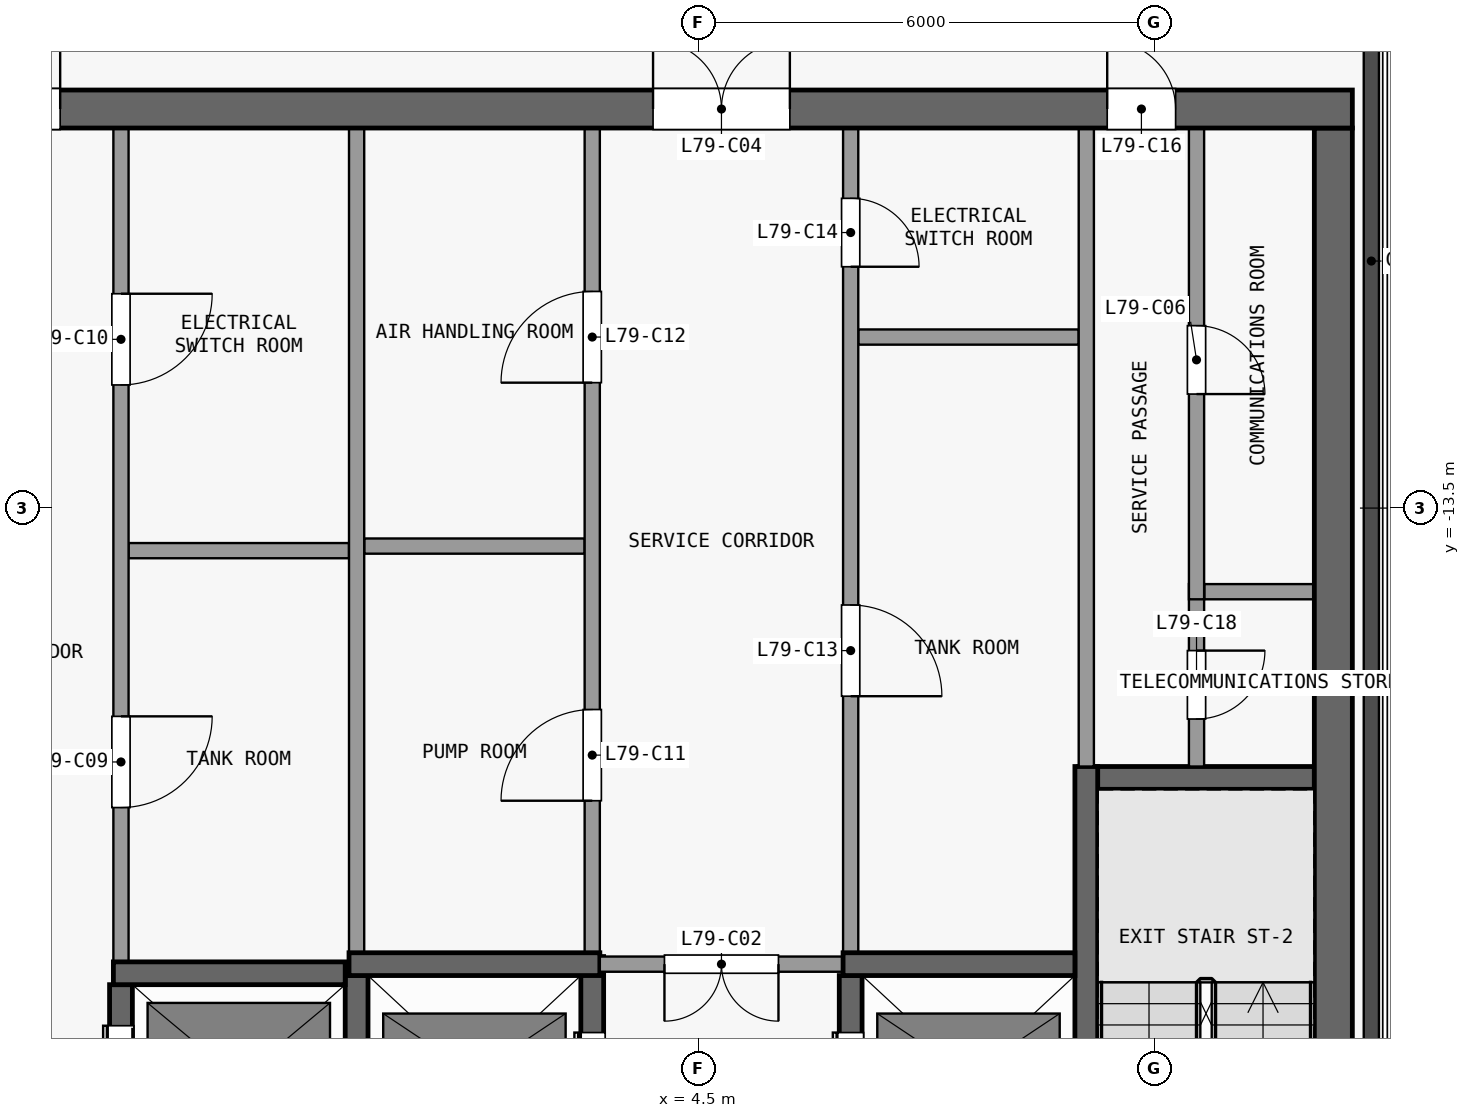
"""IFC4 building model, lengths in metres.
Left out: names, types, materials, properties, quantities, classifications, styles, units other than length and angle.
Written with IfcOpenShell. Run it as: python <this file> out.ifc"""

import sys

from ifc_helpers import new_model, si_unit, direction, frame, frame_2d, origin, place, context, subcontext, project, spatial, rectangle, extrude, element, fill, save


model = new_model("IFC4")
c1 = context("Model", 3, precision=1e-05, world=origin(), true_north=direction((0.0, 1.0)))
c2 = subcontext(c1, "Body", "Model", "MODEL_VIEW")
j1 = project(units=[si_unit("LENGTHUNIT", "METRE"), si_unit("PLANEANGLEUNIT", "RADIAN")], contexts=[c1])
p1 = place(None, origin())
s1 = spatial("IfcSite", under=j1, at=p1, CompositionType="ELEMENT")
p2 = place(p1, origin())
s2 = spatial("IfcBuilding", under=s1, at=p2, CompositionType="ELEMENT")
p3 = place(p2, frame((0.0, 0.0, 312.2)))
s3 = spatial("IfcBuildingStorey", under=s2, at=p3, CompositionType="ELEMENT", Elevation=312.2)
p4 = place(p3, frame((-13.1, -8.25, 0.0), z_axis=(0.0, 0.0, 1.0), x_axis=(1.0, 0.0, 0.0)))
e1 = element("IfcWall", 1, at=p4, inside=s3, PredefinedType="SHEAR", context=c2, shape_type="SweptSolid", body=[
    extrude(rectangle(XDim=26.2, YDim=0.5, at=frame_2d((13.1, 0.0))), origin(), (0.0, 0.0, 1.0), 4.2),
])
p5 = place(p4, frame((7.4, 0.0, 0.0)))
e2 = element("IfcOpeningElement", 2, at=p5, cuts=e1, PredefinedType="OPENING", context=c2, shape_type="SweptSolid", body=[
    extrude(rectangle(XDim=1.8, YDim=2.1, at=frame_2d((0.9, 1.05))), frame((0.0, 0.26, 0.0), z_axis=(0.0, -1.0, 0.0), x_axis=(1.0, 0.0, 0.0)), (0.0, 0.0, 1.0), 0.52),
])
p6 = place(p4, frame((17.0, 0.0, 0.0)))
e3 = element("IfcOpeningElement", 3, at=p6, cuts=e1, PredefinedType="OPENING", context=c2, shape_type="SweptSolid", body=[
    extrude(rectangle(XDim=1.8, YDim=2.1, at=frame_2d((0.9, 1.05))), frame((0.0, 0.26, 0.0), z_axis=(0.0, -1.0, 0.0), x_axis=(1.0, 0.0, 0.0)), (0.0, 0.0, 1.0), 0.52),
])
p7 = place(p4, frame((1.325, 0.0, 0.0)))
e4 = element("IfcOpeningElement", 4, at=p7, cuts=e1, PredefinedType="OPENING", context=c2, shape_type="SweptSolid", body=[
    extrude(rectangle(XDim=1.2, YDim=2.1, at=frame_2d((0.6, 1.05))), frame((0.0, 0.26, 0.0), z_axis=(0.0, -1.0, 0.0), x_axis=(1.0, 0.0, 0.0)), (0.0, 0.0, 1.0), 0.52),
])
p8 = place(p4, frame((22.975, 0.0, 0.0)))
e5 = element("IfcOpeningElement", 5, at=p8, cuts=e1, PredefinedType="OPENING", context=c2, shape_type="SweptSolid", body=[
    extrude(rectangle(XDim=0.9, YDim=2.1, at=frame_2d((0.45, 1.05))), frame((0.0, 0.26, 0.0), z_axis=(0.0, -1.0, 0.0), x_axis=(1.0, 0.0, 0.0)), (0.0, 0.0, 1.0), 0.52),
])
p9 = place(p3, frame((12.85, -24.6, 0.0), z_axis=(0.0, 0.0, 1.0), x_axis=(0.0, 1.0, 0.0)))
e6 = element("IfcWall", 6, at=p9, inside=s3, PredefinedType="SHEAR", context=c2, shape_type="SweptSolid", body=[
    extrude(rectangle(XDim=16.1, YDim=0.5, at=frame_2d((8.05, 0.0))), origin(), (0.0, 0.0, 1.0), 4.2),
])
p10 = place(p3, frame((-3.2, -19.62, 0.0), z_axis=(0.0, 0.0, 1.0), x_axis=(1.0, 0.0, 0.0)))
e7 = element("IfcWall", 7, at=p10, inside=s3, PredefinedType="SHEAR", context=c2, shape_type="SweptSolid", body=[
    extrude(rectangle(XDim=3.05, YDim=0.3, at=frame_2d((1.525, 0.0))), origin(), (0.0, 0.0, 1.0), 4.2),
])
p11 = place(p3, frame((-0.1, -19.5, 0.0), z_axis=(0.0, 0.0, 1.0), x_axis=(1.0, 0.0, 0.0)))
e8 = element("IfcWall", 8, at=p11, inside=s3, PredefinedType="SHEAR", context=c2, shape_type="SweptSolid", body=[
    extrude(rectangle(XDim=3.3, YDim=0.3, at=frame_2d((1.65, 0.0))), origin(), (0.0, 0.0, 1.0), 4.2),
])
p12 = place(p3, frame((6.4, -19.5, 0.0), z_axis=(0.0, 0.0, 1.0), x_axis=(-1.0, 0.0, 0.0)))
e9 = element("IfcWall", 9, at=p12, inside=s3, PredefinedType="PARTITIONING", context=c2, shape_type="SweptSolid", body=[
    extrude(rectangle(XDim=3.2, YDim=0.2, at=frame_2d((1.6, 0.0))), origin(), (0.0, 0.0, 1.0), 4.2),
])
p13 = place(p12, frame((0.85, 0.0, 0.0)))
e10 = element("IfcOpeningElement", 10, at=p13, cuts=e9, PredefinedType="OPENING", context=c2, shape_type="SweptSolid", body=[
    extrude(rectangle(XDim=1.5, YDim=2.1, at=frame_2d((0.75, 1.05))), frame((0.0, 0.11, 0.0), z_axis=(0.0, -1.0, 0.0), x_axis=(1.0, 0.0, 0.0)), (0.0, 0.0, 1.0), 0.22),
])
p14 = place(p3, frame((6.4, -19.5, 0.0), z_axis=(0.0, 0.0, 1.0), x_axis=(1.0, 0.0, 0.0)))
e11 = element("IfcWall", 11, at=p14, inside=s3, PredefinedType="SHEAR", context=c2, shape_type="SweptSolid", body=[
    extrude(rectangle(XDim=3.05, YDim=0.3, at=frame_2d((1.525, 0.0))), origin(), (0.0, 0.0, 1.0), 4.2),
])
p15 = place(p3, frame((9.5, -17.05, 0.0), z_axis=(0.0, 0.0, 1.0), x_axis=(1.0, 0.0, 0.0)))
e12 = element("IfcWall", 12, at=p15, inside=s3, PredefinedType="SHEAR", context=c2, shape_type="SweptSolid", body=[
    extrude(rectangle(XDim=3.1, YDim=0.3, at=frame_2d((1.55, 0.0))), origin(), (0.0, 0.0, 1.0), 4.2),
])
p16 = place(p3, frame((11.15, -14.6, 0.0), z_axis=(0.0, 0.0, 1.0), x_axis=(1.0, 0.0, 0.0)))
e13 = element("IfcWall", 13, at=p16, inside=s3, PredefinedType="PARTITIONING", context=c2, shape_type="SweptSolid", body=[
    extrude(rectangle(XDim=1.45, YDim=0.2, at=frame_2d((0.725, 0.0))), origin(), (0.0, 0.0, 1.0), 4.2),
])
for number, where, z_axis, x_axis in (
    (14, (-3.0, -14.06, 0.0), (0.0, 0.0, 1.0), (1.0, 0.0, 0.0)),
    (15, (0.1, -14.0, 0.0), (0.0, 0.0, 1.0), (1.0, 0.0, 0.0)),
    (16, (6.6, -11.25, 0.0), (0.0, 0.0, 1.0), (1.0, 0.0, 0.0)),
):
    element("IfcWall", number, at=place(p3, frame(where, z_axis=z_axis, x_axis=x_axis)), inside=s3, PredefinedType="PARTITIONING", context=c2, shape_type="SweptSolid", body=[
        extrude(rectangle(XDim=2.9, YDim=0.2, at=frame_2d((1.45, 0.0))), origin(), (0.0, 0.0, 1.0), 4.2),
    ])
p17 = place(p3, frame((-3.1, -22.25, 0.0), z_axis=(0.0, 0.0, 1.0), x_axis=(0.0, 1.0, 0.0)))
e17 = element("IfcWall", 17, at=p17, inside=s3, PredefinedType="SHEAR", context=c2, shape_type="SweptSolid", body=[
    extrude(rectangle(XDim=2.48, YDim=0.3, at=frame_2d((1.24, 0.0))), origin(), (0.0, 0.0, 1.0), 4.2),
])
p18 = place(p17, frame((0.54, 0.0, 0.0)))
e18 = element("IfcOpeningElement", 18, at=p18, cuts=e17, PredefinedType="OPENING", context=c2, shape_type="SweptSolid", body=[
    extrude(rectangle(XDim=1.4, YDim=2.1, at=frame_2d((0.7, 1.05))), frame((0.0, 0.16, 0.0), z_axis=(0.0, -1.0, 0.0), x_axis=(1.0, 0.0, 0.0)), (0.0, 0.0, 1.0), 0.32),
])
p19 = place(p3, frame((-3.1, -8.5, 0.0), z_axis=(0.0, 0.0, 1.0), x_axis=(0.0, -1.0, 0.0)))
e19 = element("IfcWall", 19, at=p19, inside=s3, PredefinedType="PARTITIONING", context=c2, shape_type="SweptSolid", body=[
    extrude(rectangle(XDim=10.97, YDim=0.2, at=frame_2d((5.485, 0.0))), origin(), (0.0, 0.0, 1.0), 4.2),
])
p20 = place(p19, frame((7.74, 0.0, 0.0)))
e20 = element("IfcOpeningElement", 20, at=p20, cuts=e19, PredefinedType="OPENING", context=c2, shape_type="SweptSolid", body=[
    extrude(rectangle(XDim=1.2, YDim=2.1, at=frame_2d((0.6, 1.05))), frame((0.0, 0.11, 0.0), z_axis=(0.0, -1.0, 0.0), x_axis=(1.0, 0.0, 0.0)), (0.0, 0.0, 1.0), 0.22),
])
p21 = place(p19, frame((2.18, 0.0, 0.0)))
e21 = element("IfcOpeningElement", 21, at=p21, cuts=e19, PredefinedType="OPENING", context=c2, shape_type="SweptSolid", body=[
    extrude(rectangle(XDim=1.2, YDim=2.1, at=frame_2d((0.6, 1.05))), frame((0.0, 0.11, 0.0), z_axis=(0.0, -1.0, 0.0), x_axis=(1.0, 0.0, 0.0)), (0.0, 0.0, 1.0), 0.22),
])
p22 = place(p3, frame((0.0, -22.25, 0.0), z_axis=(0.0, 0.0, 1.0), x_axis=(0.0, 1.0, 0.0)))
e22 = element("IfcWall", 22, at=p22, inside=s3, PredefinedType="SHEAR", context=c2, shape_type="SweptSolid", body=[
    extrude(rectangle(XDim=2.6, YDim=0.3, at=frame_2d((1.3, 0.0))), origin(), (0.0, 0.0, 1.0), 4.2),
])
p23 = place(p3, frame((0.0, -19.35, 0.0), z_axis=(0.0, 0.0, 1.0), x_axis=(0.0, 1.0, 0.0)))
e23 = element("IfcWall", 23, at=p23, inside=s3, PredefinedType="PARTITIONING", context=c2, shape_type="SweptSolid", body=[
    extrude(rectangle(XDim=10.85, YDim=0.2, at=frame_2d((5.425, 0.0))), origin(), (0.0, 0.0, 1.0), 4.2),
])
p24 = place(p3, frame((3.1, -22.25, 0.0), z_axis=(0.0, 0.0, 1.0), x_axis=(0.0, 1.0, 0.0)))
e24 = element("IfcWall", 24, at=p24, inside=s3, PredefinedType="SHEAR", context=c2, shape_type="SweptSolid", body=[
    extrude(rectangle(XDim=2.85, YDim=0.3, at=frame_2d((1.425, 0.0))), origin(), (0.0, 0.0, 1.0), 4.2),
])
p25 = place(p24, frame((0.75, 0.0, 0.0)))
e25 = element("IfcOpeningElement", 25, at=p25, cuts=e24, PredefinedType="OPENING", context=c2, shape_type="SweptSolid", body=[
    extrude(rectangle(XDim=1.1, YDim=2.1, at=frame_2d((0.55, 1.05))), frame((0.0, 0.16, 0.0), z_axis=(0.0, -1.0, 0.0), x_axis=(1.0, 0.0, 0.0)), (0.0, 0.0, 1.0), 0.32),
])
p26 = place(p3, frame((3.1, -19.6, 0.0), z_axis=(0.0, 0.0, 1.0), x_axis=(0.0, 1.0, 0.0)))
e26 = element("IfcWall", 26, at=p26, inside=s3, PredefinedType="PARTITIONING", context=c2, shape_type="SweptSolid", body=[
    extrude(rectangle(XDim=11.1, YDim=0.2, at=frame_2d((5.55, 0.0))), origin(), (0.0, 0.0, 1.0), 4.2),
])
p27 = place(p26, frame((2.25, 0.0, 0.0)))
e27 = element("IfcOpeningElement", 27, at=p27, cuts=e26, PredefinedType="OPENING", context=c2, shape_type="SweptSolid", body=[
    extrude(rectangle(XDim=1.2, YDim=2.1, at=frame_2d((0.6, 1.05))), frame((0.0, 0.11, 0.0), z_axis=(0.0, -1.0, 0.0), x_axis=(1.0, 0.0, 0.0)), (0.0, 0.0, 1.0), 0.22),
])
p28 = place(p26, frame((7.75, 0.0, 0.0)))
e28 = element("IfcOpeningElement", 28, at=p28, cuts=e26, PredefinedType="OPENING", context=c2, shape_type="SweptSolid", body=[
    extrude(rectangle(XDim=1.2, YDim=2.1, at=frame_2d((0.6, 1.05))), frame((0.0, 0.11, 0.0), z_axis=(0.0, -1.0, 0.0), x_axis=(1.0, 0.0, 0.0)), (0.0, 0.0, 1.0), 0.22),
])
p29 = place(p3, frame((6.5, -22.25, 0.0), z_axis=(0.0, 0.0, 1.0), x_axis=(0.0, 1.0, 0.0)))
e29 = element("IfcWall", 29, at=p29, inside=s3, PredefinedType="SHEAR", context=c2, shape_type="SweptSolid", body=[
    extrude(rectangle(XDim=2.6, YDim=0.3, at=frame_2d((1.3, 0.0))), origin(), (0.0, 0.0, 1.0), 4.2),
])
p30 = place(p29, frame((0.75, 0.0, 0.0)))
e30 = element("IfcOpeningElement", 30, at=p30, cuts=e29, PredefinedType="OPENING", context=c2, shape_type="SweptSolid", body=[
    extrude(rectangle(XDim=1.1, YDim=2.1, at=frame_2d((0.55, 1.05))), frame((0.0, 0.16, 0.0), z_axis=(0.0, -1.0, 0.0), x_axis=(1.0, 0.0, 0.0)), (0.0, 0.0, 1.0), 0.32),
])
p31 = place(p3, frame((6.5, -8.5, 0.0), z_axis=(0.0, 0.0, 1.0), x_axis=(0.0, -1.0, 0.0)))
e31 = element("IfcWall", 31, at=p31, inside=s3, PredefinedType="PARTITIONING", context=c2, shape_type="SweptSolid", body=[
    extrude(rectangle(XDim=10.85, YDim=0.2, at=frame_2d((5.425, 0.0))), origin(), (0.0, 0.0, 1.0), 4.2),
])
p32 = place(p31, frame((6.275, 0.0, 0.0)))
e32 = element("IfcOpeningElement", 32, at=p32, cuts=e31, PredefinedType="OPENING", context=c2, shape_type="SweptSolid", body=[
    extrude(rectangle(XDim=1.2, YDim=2.1, at=frame_2d((0.6, 1.05))), frame((0.0, 0.11, 0.0), z_axis=(0.0, -1.0, 0.0), x_axis=(1.0, 0.0, 0.0)), (0.0, 0.0, 1.0), 0.22),
])
p33 = place(p31, frame((0.925, 0.0, 0.0)))
e33 = element("IfcOpeningElement", 33, at=p33, cuts=e31, PredefinedType="OPENING", context=c2, shape_type="SweptSolid", body=[
    extrude(rectangle(XDim=0.9, YDim=2.1, at=frame_2d((0.45, 1.05))), frame((0.0, 0.11, 0.0), z_axis=(0.0, -1.0, 0.0), x_axis=(1.0, 0.0, 0.0)), (0.0, 0.0, 1.0), 0.22),
])
p34 = place(p3, frame((9.6, -16.9, 0.0), z_axis=(0.0, 0.0, 1.0), x_axis=(0.0, -1.0, 0.0)))
e34 = element("IfcWall", 34, at=p34, inside=s3, PredefinedType="SHEAR", context=c2, shape_type="SweptSolid", body=[
    extrude(rectangle(XDim=7.7, YDim=0.3, at=frame_2d((3.85, 0.0))), origin(), (0.0, 0.0, 1.0), 4.2),
])
p35 = place(p34, frame((6.5, 0.0, 0.0)))
e35 = element("IfcOpeningElement", 35, at=p35, cuts=e34, PredefinedType="OPENING", context=c2, shape_type="SweptSolid", body=[
    extrude(rectangle(XDim=1.1, YDim=2.1, at=frame_2d((0.55, 1.05))), frame((0.0, 0.16, 0.0), z_axis=(0.0, -1.0, 0.0), x_axis=(1.0, 0.0, 0.0)), (0.0, 0.0, 1.0), 0.32),
])
p36 = place(p3, frame((9.6, -16.9, 0.0), z_axis=(0.0, 0.0, 1.0), x_axis=(0.0, 1.0, 0.0)))
e36 = element("IfcWall", 36, at=p36, inside=s3, PredefinedType="PARTITIONING", context=c2, shape_type="SweptSolid", body=[
    extrude(rectangle(XDim=8.4, YDim=0.2, at=frame_2d((4.2, 0.0))), origin(), (0.0, 0.0, 1.0), 4.2),
])
p37 = place(p3, frame((11.05, -14.5, 0.0), z_axis=(0.0, 0.0, 1.0), x_axis=(0.0, -1.0, 0.0)))
e37 = element("IfcWall", 37, at=p37, inside=s3, PredefinedType="PARTITIONING", context=c2, shape_type="SweptSolid", body=[
    extrude(rectangle(XDim=2.4, YDim=0.2, at=frame_2d((1.2, 0.0))), origin(), (0.0, 0.0, 1.0), 4.2),
])
p38 = place(p37, frame((0.875, 0.0, 0.0)))
e38 = element("IfcOpeningElement", 38, at=p38, cuts=e37, PredefinedType="OPENING", context=c2, shape_type="SweptSolid", body=[
    extrude(rectangle(XDim=0.9, YDim=2.1, at=frame_2d((0.45, 1.05))), frame((0.0, 0.11, 0.0), z_axis=(0.0, -1.0, 0.0), x_axis=(1.0, 0.0, 0.0)), (0.0, 0.0, 1.0), 0.22),
])
p39 = place(p3, frame((11.05, -8.5, 0.0), z_axis=(0.0, 0.0, 1.0), x_axis=(0.0, -1.0, 0.0)))
e39 = element("IfcWall", 39, at=p39, inside=s3, PredefinedType="PARTITIONING", context=c2, shape_type="SweptSolid", body=[
    extrude(rectangle(XDim=6.2, YDim=0.2, at=frame_2d((3.1, 0.0))), origin(), (0.0, 0.0, 1.0), 4.2),
])
p40 = place(p39, frame((2.6, 0.0, 0.0)))
e40 = element("IfcOpeningElement", 40, at=p40, cuts=e39, PredefinedType="OPENING", context=c2, shape_type="SweptSolid", body=[
    extrude(rectangle(XDim=0.9, YDim=2.1, at=frame_2d((0.45, 1.05))), frame((0.0, 0.11, 0.0), z_axis=(0.0, -1.0, 0.0), x_axis=(1.0, 0.0, 0.0)), (0.0, 0.0, 1.0), 0.22),
])
p41 = place(p25, origin())
e41 = element("IfcDoor", 41, at=p41, inside=s3, OperationType="DOUBLE_DOOR_SLIDING", PredefinedType="DOOR", context=c2, shape_type="SweptSolid", body=[
    extrude(rectangle(XDim=1.1, YDim=2.1, at=frame_2d((0.55, 1.05))), frame((0.0, 0.025, 0.0), z_axis=(0.0, -1.0, 0.0), x_axis=(1.0, 0.0, 0.0)), (0.0, 0.0, 1.0), 0.05),
])
fill(e25, e41)
p42 = place(p30, origin())
e42 = element("IfcDoor", 42, at=p42, inside=s3, OperationType="DOUBLE_DOOR_SLIDING", PredefinedType="DOOR", context=c2, shape_type="SweptSolid", body=[
    extrude(rectangle(XDim=1.1, YDim=2.1, at=frame_2d((0.55, 1.05))), frame((0.0, 0.025, 0.0), z_axis=(0.0, -1.0, 0.0), x_axis=(1.0, 0.0, 0.0)), (0.0, 0.0, 1.0), 0.05),
])
fill(e30, e42)
p43 = place(p18, origin())
e43 = element("IfcDoor", 43, at=p43, inside=s3, OperationType="DOUBLE_DOOR_SLIDING", PredefinedType="DOOR", context=c2, shape_type="SweptSolid", body=[
    extrude(rectangle(XDim=1.4, YDim=2.1, at=frame_2d((0.7, 1.05))), frame((0.0, 0.025, 0.0), z_axis=(0.0, -1.0, 0.0), x_axis=(1.0, 0.0, 0.0)), (0.0, 0.0, 1.0), 0.05),
])
fill(e18, e43)
p44 = place(p13, origin())
e44 = element("IfcDoor", 44, at=p44, inside=s3, OperationType="DOUBLE_DOOR_SINGLE_SWING", PredefinedType="DOOR", context=c2, shape_type="SweptSolid", body=[
    extrude(rectangle(XDim=1.5, YDim=2.1, at=frame_2d((0.75, 1.05))), frame((0.0, 0.025, 0.0), z_axis=(0.0, -1.0, 0.0), x_axis=(1.0, 0.0, 0.0)), (0.0, 0.0, 1.0), 0.05),
])
fill(e10, e44)
p45 = place(p5, origin())
e45 = element("IfcDoor", 45, at=p45, inside=s3, OperationType="DOUBLE_DOOR_SINGLE_SWING", PredefinedType="DOOR", context=c2, shape_type="SweptSolid", body=[
    extrude(rectangle(XDim=1.8, YDim=2.1, at=frame_2d((0.9, 1.05))), frame((0.0, 0.025, 0.0), z_axis=(0.0, -1.0, 0.0), x_axis=(1.0, 0.0, 0.0)), (0.0, 0.0, 1.0), 0.05),
])
fill(e2, e45)
p46 = place(p6, origin())
e46 = element("IfcDoor", 46, at=p46, inside=s3, OperationType="DOUBLE_DOOR_SINGLE_SWING", PredefinedType="DOOR", context=c2, shape_type="SweptSolid", body=[
    extrude(rectangle(XDim=1.8, YDim=2.1, at=frame_2d((0.9, 1.05))), frame((0.0, 0.025, 0.0), z_axis=(0.0, -1.0, 0.0), x_axis=(1.0, 0.0, 0.0)), (0.0, 0.0, 1.0), 0.05),
])
fill(e3, e46)
p47 = place(p40, origin())
e47 = element("IfcDoor", 47, at=p47, inside=s3, OperationType="SINGLE_SWING_RIGHT", PredefinedType="DOOR", context=c2, shape_type="SweptSolid", body=[
    extrude(rectangle(XDim=0.9, YDim=2.1, at=frame_2d((0.45, 1.05))), frame((0.0, 0.025, 0.0), z_axis=(0.0, -1.0, 0.0), x_axis=(1.0, 0.0, 0.0)), (0.0, 0.0, 1.0), 0.05),
])
fill(e40, e47)
p48 = place(p20, origin())
e48 = element("IfcDoor", 48, at=p48, inside=s3, OperationType="SINGLE_SWING_LEFT", PredefinedType="DOOR", context=c2, shape_type="SweptSolid", body=[
    extrude(rectangle(XDim=1.2, YDim=2.1, at=frame_2d((0.6, 1.05))), frame((0.0, 0.025, 0.0), z_axis=(0.0, -1.0, 0.0), x_axis=(1.0, 0.0, 0.0)), (0.0, 0.0, 1.0), 0.05),
])
fill(e20, e48)
p49 = place(p21, origin())
e49 = element("IfcDoor", 49, at=p49, inside=s3, OperationType="SINGLE_SWING_LEFT", PredefinedType="DOOR", context=c2, shape_type="SweptSolid", body=[
    extrude(rectangle(XDim=1.2, YDim=2.1, at=frame_2d((0.6, 1.05))), frame((0.0, 0.025, 0.0), z_axis=(0.0, -1.0, 0.0), x_axis=(1.0, 0.0, 0.0)), (0.0, 0.0, 1.0), 0.05),
])
fill(e21, e49)
p50 = place(p27, origin())
e50 = element("IfcDoor", 50, at=p50, inside=s3, OperationType="SINGLE_SWING_LEFT", PredefinedType="DOOR", context=c2, shape_type="SweptSolid", body=[
    extrude(rectangle(XDim=1.2, YDim=2.1, at=frame_2d((0.6, 1.05))), frame((0.0, 0.025, 0.0), z_axis=(0.0, -1.0, 0.0), x_axis=(1.0, 0.0, 0.0)), (0.0, 0.0, 1.0), 0.05),
])
fill(e27, e50)
p51 = place(p28, origin())
e51 = element("IfcDoor", 51, at=p51, inside=s3, OperationType="SINGLE_SWING_LEFT", PredefinedType="DOOR", context=c2, shape_type="SweptSolid", body=[
    extrude(rectangle(XDim=1.2, YDim=2.1, at=frame_2d((0.6, 1.05))), frame((0.0, 0.025, 0.0), z_axis=(0.0, -1.0, 0.0), x_axis=(1.0, 0.0, 0.0)), (0.0, 0.0, 1.0), 0.05),
])
fill(e28, e51)
p52 = place(p32, origin())
e52 = element("IfcDoor", 52, at=p52, inside=s3, OperationType="SINGLE_SWING_RIGHT", PredefinedType="DOOR", context=c2, shape_type="SweptSolid", body=[
    extrude(rectangle(XDim=1.2, YDim=2.1, at=frame_2d((0.6, 1.05))), frame((0.0, 0.025, 0.0), z_axis=(0.0, -1.0, 0.0), x_axis=(1.0, 0.0, 0.0)), (0.0, 0.0, 1.0), 0.05),
])
fill(e32, e52)
p53 = place(p33, origin())
e53 = element("IfcDoor", 53, at=p53, inside=s3, OperationType="SINGLE_SWING_RIGHT", PredefinedType="DOOR", context=c2, shape_type="SweptSolid", body=[
    extrude(rectangle(XDim=0.9, YDim=2.1, at=frame_2d((0.45, 1.05))), frame((0.0, 0.025, 0.0), z_axis=(0.0, -1.0, 0.0), x_axis=(1.0, 0.0, 0.0)), (0.0, 0.0, 1.0), 0.05),
])
fill(e33, e53)
p54 = place(p8, origin())
e54 = element("IfcDoor", 54, at=p54, inside=s3, OperationType="SINGLE_SWING_LEFT", PredefinedType="DOOR", context=c2, shape_type="SweptSolid", body=[
    extrude(rectangle(XDim=0.9, YDim=2.1, at=frame_2d((0.45, 1.05))), frame((0.0, 0.025, 0.0), z_axis=(0.0, -1.0, 0.0), x_axis=(1.0, 0.0, 0.0)), (0.0, 0.0, 1.0), 0.05),
])
fill(e5, e54)
p55 = place(p38, origin())
e55 = element("IfcDoor", 55, at=p55, inside=s3, OperationType="SINGLE_SWING_LEFT", PredefinedType="DOOR", context=c2, shape_type="SweptSolid", body=[
    extrude(rectangle(XDim=0.9, YDim=2.1, at=frame_2d((0.45, 1.05))), frame((0.0, 0.025, 0.0), z_axis=(0.0, -1.0, 0.0), x_axis=(1.0, 0.0, 0.0)), (0.0, 0.0, 1.0), 0.05),
])
fill(e38, e55)
save(model, sys.argv[1])
